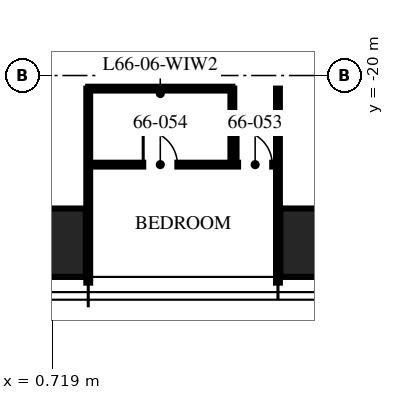
"""IFC4 building model, lengths in metres.
Left out: names, types, materials, properties, quantities, classifications, styles, units other than length and angle.
Written with IfcOpenShell. Run it as: python <this file> out.ifc"""

import sys

from ifc_helpers import new_model, si_unit, direction, frame, frame_2d, origin, origin_2d, place, context, subcontext, project, spatial, rectangle, hollow_rectangle, extrude, element, fill, save


model = new_model("IFC4")
c1 = context("Model", 3, precision=1e-05, world=origin(), true_north=direction((0.0, 1.0)))
c2 = subcontext(c1, "Body", "Model", "MODEL_VIEW")
j1 = project(units=[si_unit("LENGTHUNIT", "METRE"), si_unit("PLANEANGLEUNIT", "RADIAN")], contexts=[c1])
p1 = place(None, origin())
s1 = spatial("IfcSite", under=j1, at=p1, CompositionType="ELEMENT")
p2 = place(p1, origin())
s2 = spatial("IfcBuilding", under=s1, at=p2, CompositionType="ELEMENT")
p3 = place(p2, frame((0.0, 0.0, 263.25)))
s3 = spatial("IfcBuildingStorey", under=s2, at=p3, CompositionType="ELEMENT", Elevation=263.25)
for number, where, z_axis, x_axis in (
    (1, (8.32, -24.4, 0.0), (0.0, 0.0, 1.0), (1.0, 0.0, 0.0)),
    (2, (0.0, -24.4, 0.0), (0.0, 0.0, 1.0), (1.0, 0.0, 0.0)),
):
    element("IfcColumn", number, at=place(p3, frame(where, z_axis=z_axis, x_axis=x_axis)), inside=s3, PredefinedType="COLUMN", context=c2, shape_type="SweptSolid", body=[
        extrude(hollow_rectangle(XDim=3.2, YDim=1.8, WallThickness=0.14, at=origin_2d()), origin(), (0.0, 0.0, 1.0), 3.75),
    ])
for number, where, z_axis, x_axis in (
    (3, (1.664, -20.345, 0.0), (0.0, 0.0, 1.0), (0.0, -1.0, 0.0)),
    (4, (6.656, -20.345, 0.0), (0.0, 0.0, 1.0), (0.0, -1.0, 0.0)),
):
    element("IfcWall", number, at=place(p3, frame(where, z_axis=z_axis, x_axis=x_axis)), inside=s3, PredefinedType="PARTITIONING", context=c2, shape_type="SweptSolid", body=[
        extrude(rectangle(XDim=5.105, YDim=0.1, at=frame_2d((2.552, 0.0))), origin(), (0.0, 0.0, 1.0), 2.91),
    ])
p4 = place(p3, frame((1.664, -22.345, 0.0), z_axis=(0.0, 0.0, 1.0), x_axis=(1.0, 0.0, 0.0)))
e5 = element("IfcWall", 5, at=p4, inside=s3, PredefinedType="PARTITIONING", context=c2, shape_type="SweptSolid", body=[
    extrude(rectangle(XDim=4.992, YDim=0.1, at=frame_2d((2.496, 0.0))), origin(), (0.0, 0.0, 1.0), 2.81),
])
p5 = place(p4, frame((3.942, 0.0, 0.0)))
e6 = element("IfcOpeningElement", 6, at=p5, cuts=e5, PredefinedType="OPENING", context=c2, shape_type="SweptSolid", body=[
    extrude(rectangle(XDim=0.9, YDim=2.1, at=frame_2d((0.45, 1.05))), frame((0.0, 0.06, 0.0), z_axis=(0.0, -1.0, 0.0), x_axis=(1.0, 0.0, 0.0)), (0.0, 0.0, 1.0), 0.12),
])
p6 = place(p4, frame((1.446, 0.0, 0.0)))
e7 = element("IfcOpeningElement", 7, at=p6, cuts=e5, PredefinedType="OPENING", context=c2, shape_type="SweptSolid", body=[
    extrude(rectangle(XDim=0.9, YDim=2.1, at=frame_2d((0.45, 1.05))), frame((0.0, 0.06, 0.0), z_axis=(0.0, -1.0, 0.0), x_axis=(1.0, 0.0, 0.0)), (0.0, 0.0, 1.0), 0.12),
])
p7 = place(p3, frame((5.456, -20.345, 0.0), z_axis=(0.0, 0.0, 1.0), x_axis=(0.0, -1.0, 0.0)))
e8 = element("IfcWall", 8, at=p7, inside=s3, PredefinedType="PARTITIONING", context=c2, shape_type="SweptSolid", body=[
    extrude(rectangle(XDim=2.0, YDim=0.1, at=frame_2d((1.0, 0.0))), origin(), (0.0, 0.0, 1.0), 3.5),
])
p8 = place(p3, frame((1.664, -20.345, 0.0), z_axis=(0.0, 0.0, 1.0), x_axis=(1.0, 0.0, 0.0)))
e9 = element("IfcWall", 9, at=p8, inside=s3, PredefinedType="PARTITIONING", context=c2, shape_type="SweptSolid", body=[
    extrude(rectangle(XDim=3.792, YDim=0.1, at=frame_2d((1.896, 0.0))), origin(), (0.0, 0.0, 1.0), 2.81),
])
p9 = place(p5, origin())
e10 = element("IfcDoor", 10, at=p9, inside=s3, OperationType="SINGLE_SWING_LEFT", PredefinedType="DOOR", context=c2, shape_type="SweptSolid", body=[
    extrude(rectangle(XDim=0.9, YDim=2.1, at=frame_2d((0.45, 1.05))), frame((0.0, 0.025, 0.0), z_axis=(0.0, -1.0, 0.0), x_axis=(1.0, 0.0, 0.0)), (0.0, 0.0, 1.0), 0.05),
])
fill(e6, e10)
p10 = place(p6, origin())
e11 = element("IfcDoor", 11, at=p10, inside=s3, OperationType="SINGLE_SWING_LEFT", PredefinedType="DOOR", context=c2, shape_type="SweptSolid", body=[
    extrude(rectangle(XDim=0.9, YDim=2.1, at=frame_2d((0.45, 1.05))), frame((0.0, 0.025, 0.0), z_axis=(0.0, -1.0, 0.0), x_axis=(1.0, 0.0, 0.0)), (0.0, 0.0, 1.0), 0.05),
])
fill(e7, e11)
save(model, sys.argv[1])
